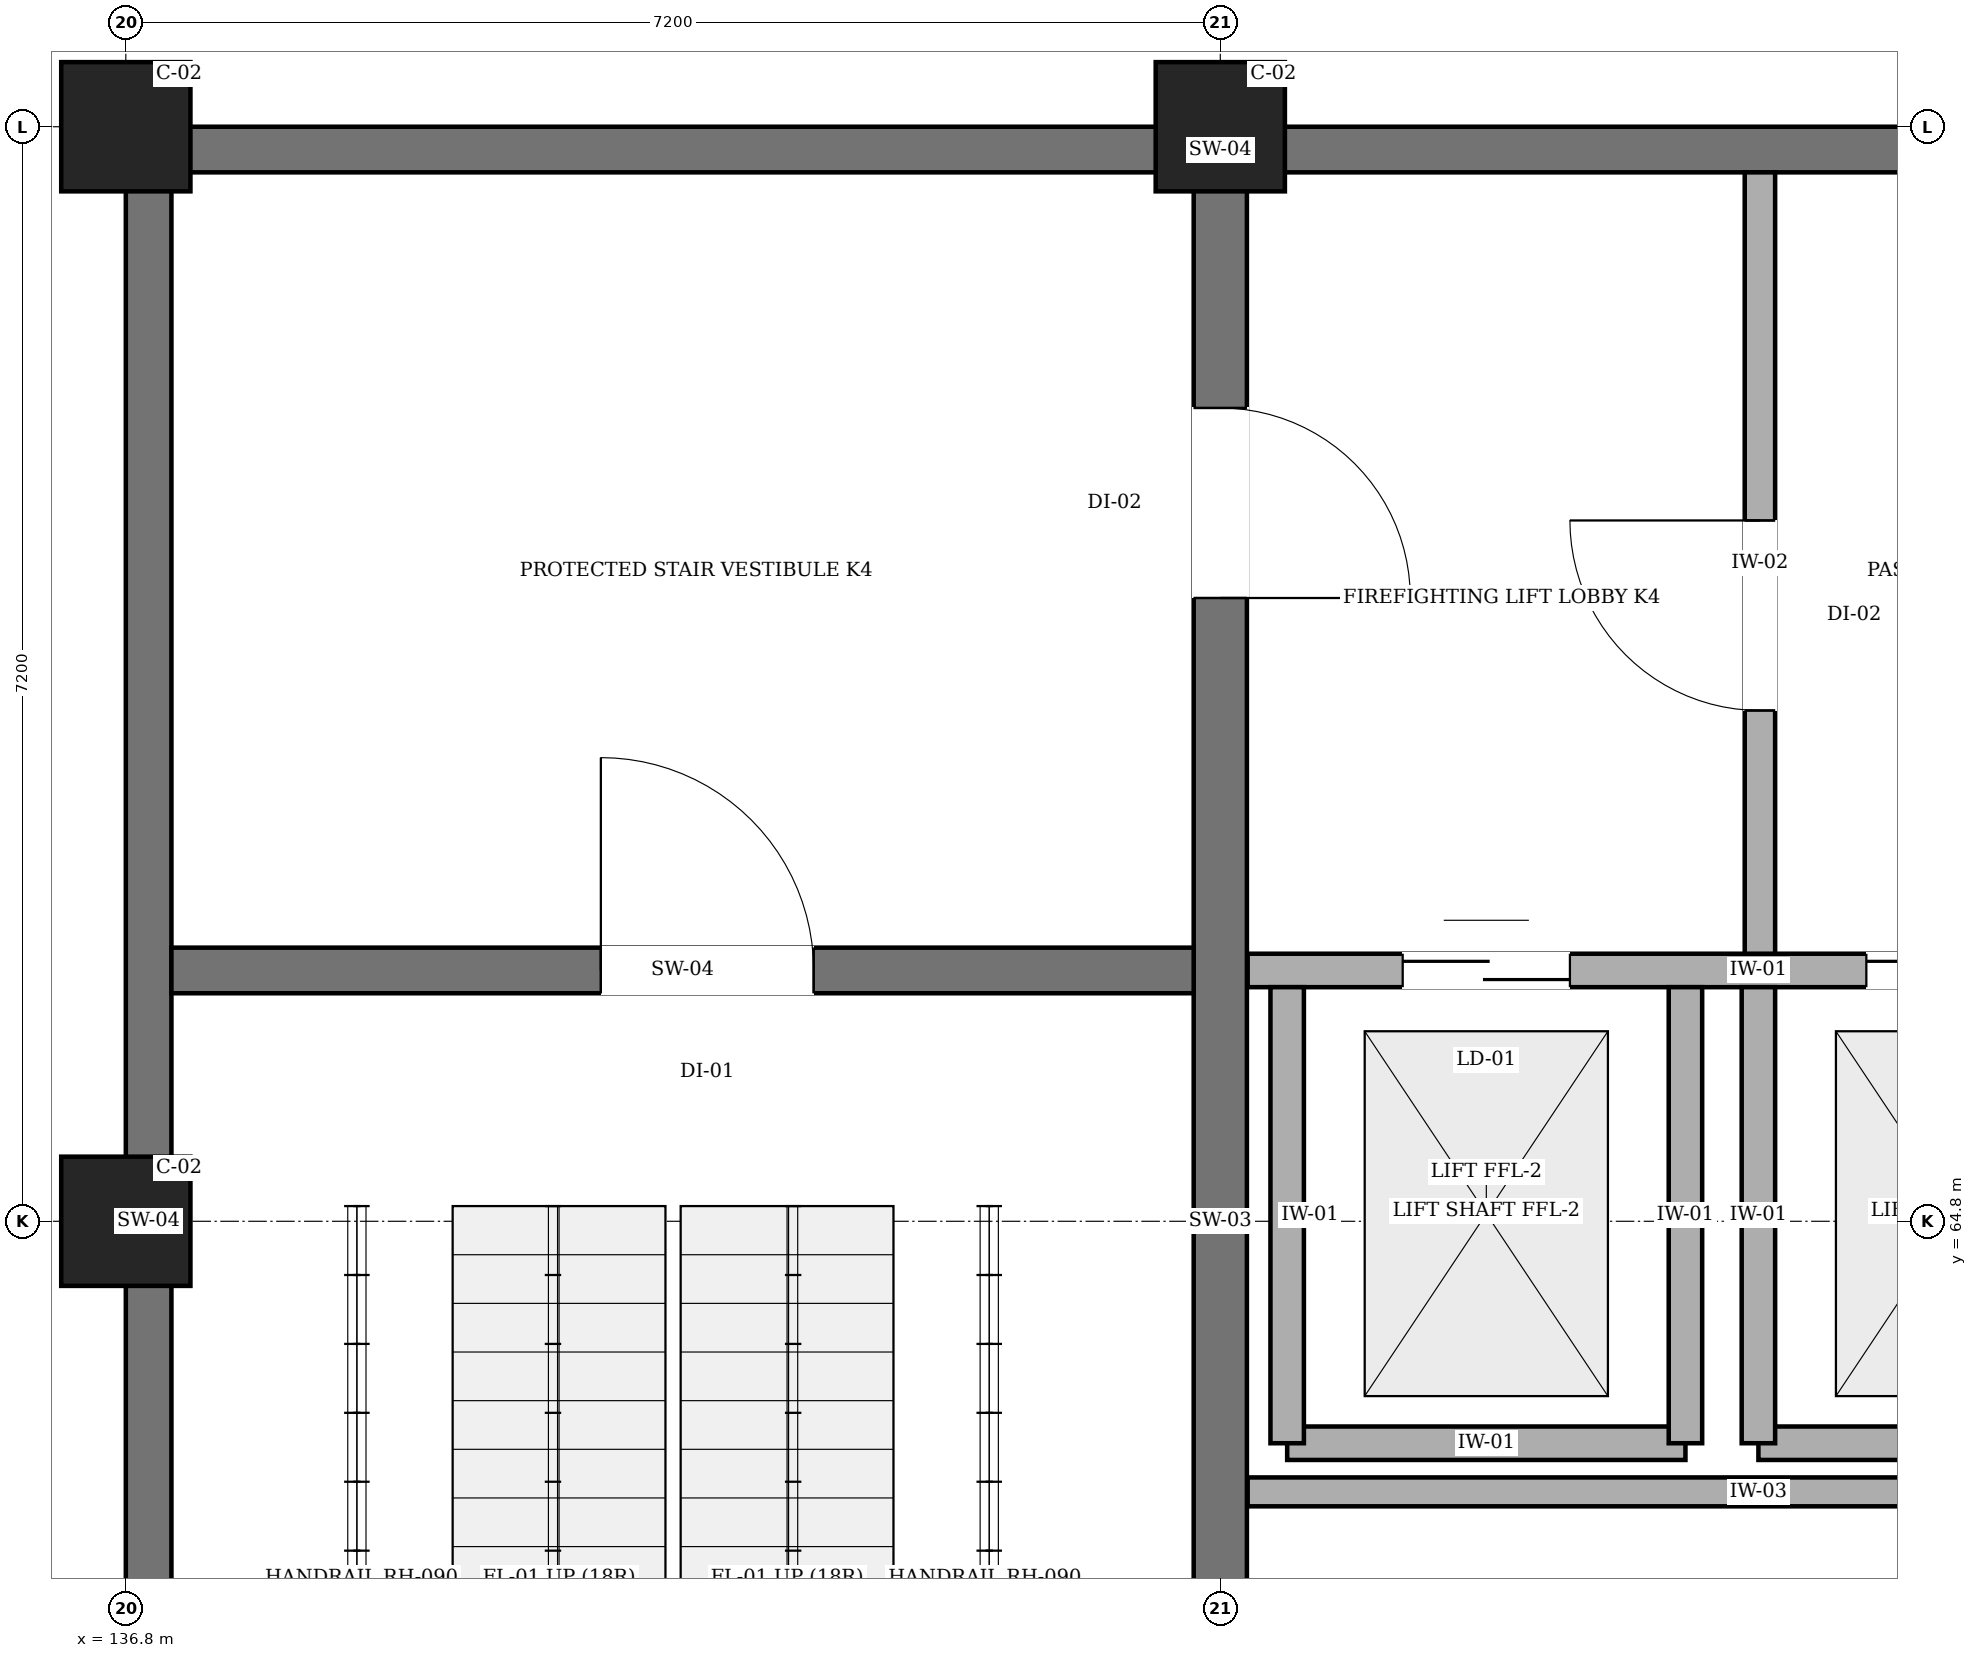
"""IFC4 building model, lengths in metres.
Left out: names, types, materials, properties, quantities, classifications, styles, units other than length and angle.
Written with IfcOpenShell. Run it as: python <this file> out.ifc"""

import sys

from ifc_helpers import new_model, si_unit, direction, frame, frame_2d, origin, origin_2d, place, context, subcontext, project, spatial, rectangle, extrude, element, fill, save


model = new_model("IFC4")
c1 = context("Model", 3, precision=1e-05, world=origin(), true_north=direction((0.0, 1.0)))
c2 = subcontext(c1, "Body", "Model", "MODEL_VIEW")
j1 = project(units=[si_unit("LENGTHUNIT", "METRE"), si_unit("PLANEANGLEUNIT", "RADIAN")], contexts=[c1])
p1 = place(None, origin())
s1 = spatial("IfcSite", under=j1, at=p1, CompositionType="ELEMENT")
p2 = place(p1, origin())
s2 = spatial("IfcBuilding", under=s1, at=p2, CompositionType="ELEMENT")
p3 = place(p2, frame((0.0, 0.0, -10.8)))
s3 = spatial("IfcBuildingStorey", under=s2, at=p3, CompositionType="ELEMENT", Elevation=-10.8)
p4 = place(p3, frame((136.8, 71.85, 0.0), z_axis=(0.0, 0.0, 1.0), x_axis=(1.0, 0.0, 0.0)))
e1 = element("IfcWall", 1, at=p4, inside=s3, PredefinedType="SHEAR", context=c2, shape_type="SweptSolid", body=[
    extrude(rectangle(XDim=14.4, YDim=0.3, at=frame_2d((7.2, 0.0))), origin(), (0.0, 0.0, 1.0), 5.4),
])
p5 = place(p3, frame((136.95, 57.9, 0.0), z_axis=(0.0, 0.0, 1.0), x_axis=(0.0, 1.0, 0.0)))
e2 = element("IfcWall", 2, at=p5, inside=s3, PredefinedType="SHEAR", context=c2, shape_type="SweptSolid", body=[
    extrude(rectangle(XDim=13.8, YDim=0.3, at=frame_2d((6.9, 0.0))), origin(), (0.0, 0.0, 1.0), 5.4),
])
p6 = place(p3, frame((144.0, 71.7, 0.0), z_axis=(0.0, 0.0, 1.0), x_axis=(0.0, -1.0, 0.0)))
e3 = element("IfcWall", 3, at=p6, inside=s3, PredefinedType="SHEAR", context=c2, shape_type="SweptSolid", body=[
    extrude(rectangle(XDim=13.8, YDim=0.35, at=frame_2d((6.9, 0.0))), origin(), (0.0, 0.0, 1.0), 5.4),
])
p7 = place(p6, frame((1.55, 0.0, 0.0)))
e4 = element("IfcOpeningElement", 4, at=p7, cuts=e3, PredefinedType="OPENING", context=c2, shape_type="SweptSolid", body=[
    extrude(rectangle(XDim=1.25, YDim=2.2, at=frame_2d((0.625, 1.1))), frame((0.0, 0.185, 0.0), z_axis=(0.0, -1.0, 0.0), x_axis=(1.0, 0.0, 0.0)), (0.0, 0.0, 1.0), 0.37),
])
p8 = place(p3, frame((137.1, 66.45, 0.0), z_axis=(0.0, 0.0, 1.0), x_axis=(1.0, 0.0, 0.0)))
e5 = element("IfcWall", 5, at=p8, inside=s3, PredefinedType="SHEAR", context=c2, shape_type="SweptSolid", body=[
    extrude(rectangle(XDim=6.725, YDim=0.3, at=frame_2d((3.362, 0.0))), origin(), (0.0, 0.0, 1.0), 5.4),
])
p9 = place(p8, frame((2.825, 0.0, 0.0)))
e6 = element("IfcOpeningElement", 6, at=p9, cuts=e5, PredefinedType="OPENING", context=c2, shape_type="SweptSolid", body=[
    extrude(rectangle(XDim=1.4, YDim=2.2, at=frame_2d((0.7, 1.1))), frame((0.0, 0.16, 0.0), z_axis=(0.0, -1.0, 0.0), x_axis=(1.0, 0.0, 0.0)), (0.0, 0.0, 1.0), 0.32),
])
for number, where, z_axis, x_axis in (
    (7, (136.8, 64.8, 0.0), (0.0, 0.0, 1.0), (1.0, 0.0, 0.0)),
    (8, (136.8, 72.0, 0.0), (0.0, 0.0, 1.0), (1.0, 0.0, 0.0)),
    (9, (144.0, 72.0, 0.0), (0.0, 0.0, 1.0), (1.0, 0.0, 0.0)),
):
    element("IfcColumn", number, at=place(p3, frame(where, z_axis=z_axis, x_axis=x_axis)), inside=s3, PredefinedType="COLUMN", context=c2, shape_type="SweptSolid", body=[
        extrude(rectangle(XDim=0.85, YDim=0.85, at=origin_2d()), origin(), (0.0, 0.0, 1.0), 5.0),
    ])
p10 = place(p3, frame((144.18, 63.02, 0.0), z_axis=(0.0, 0.0, 1.0), x_axis=(1.0, 0.0, 0.0)))
e10 = element("IfcWall", 10, at=p10, inside=s3, PredefinedType="PARTITIONING", context=c2, shape_type="SweptSolid", body=[
    extrude(rectangle(XDim=6.72, YDim=0.19, at=frame_2d((3.36, 0.0))), origin(), (0.0, 0.0, 1.0), 5.05),
])
p11 = place(p3, frame((144.18, 66.45, 0.0), z_axis=(0.0, 0.0, 1.0), x_axis=(1.0, 0.0, 0.0)))
e11 = element("IfcWall", 11, at=p11, inside=s3, PredefinedType="PARTITIONING", context=c2, shape_type="SweptSolid", body=[
    extrude(rectangle(XDim=6.72, YDim=0.22, at=frame_2d((3.36, 0.0))), origin(), (0.0, 0.0, 1.0), 5.05),
])
p12 = place(p11, frame((1.02, 0.0, 0.0)))
e12 = element("IfcOpeningElement", 12, at=p12, cuts=e11, PredefinedType="OPENING", context=c2, shape_type="SweptSolid", body=[
    extrude(rectangle(XDim=1.1, YDim=2.15, at=frame_2d((0.55, 1.075))), frame((0.0, 0.12, 0.0), z_axis=(0.0, -1.0, 0.0), x_axis=(1.0, 0.0, 0.0)), (0.0, 0.0, 1.0), 0.24),
])
p13 = place(p11, frame((4.07, 0.0, 0.0)))
e13 = element("IfcOpeningElement", 13, at=p13, cuts=e11, PredefinedType="OPENING", context=c2, shape_type="SweptSolid", body=[
    extrude(rectangle(XDim=1.2, YDim=2.15, at=frame_2d((0.6, 1.075))), frame((0.0, 0.12, 0.0), z_axis=(0.0, -1.0, 0.0), x_axis=(1.0, 0.0, 0.0)), (0.0, 0.0, 1.0), 0.24),
])
p14 = place(p3, frame((144.44, 63.34, 0.0), z_axis=(0.0, 0.0, 1.0), x_axis=(1.0, 0.0, 0.0)))
e14 = element("IfcWall", 14, at=p14, inside=s3, PredefinedType="PARTITIONING", context=c2, shape_type="SweptSolid", body=[
    extrude(rectangle(XDim=2.62, YDim=0.22, at=frame_2d((1.31, 0.0))), origin(), (0.0, 0.0, 1.0), 5.05),
])
for number, where, z_axis, x_axis in (
    (15, (144.44, 63.34, 0.0), (0.0, 0.0, 1.0), (0.0, 1.0, 0.0)),
    (16, (147.06, 63.34, 0.0), (0.0, 0.0, 1.0), (0.0, 1.0, 0.0)),
):
    element("IfcWall", number, at=place(p3, frame(where, z_axis=z_axis, x_axis=x_axis)), inside=s3, PredefinedType="PARTITIONING", context=c2, shape_type="SweptSolid", body=[
        extrude(rectangle(XDim=3.0, YDim=0.22, at=frame_2d((1.5, 0.0))), origin(), (0.0, 0.0, 1.0), 5.05),
    ])
p15 = place(p3, frame((147.54, 63.34, 0.0), z_axis=(0.0, 0.0, 1.0), x_axis=(1.0, 0.0, 0.0)))
e17 = element("IfcWall", 17, at=p15, inside=s3, PredefinedType="PARTITIONING", context=c2, shape_type="SweptSolid", body=[
    extrude(rectangle(XDim=2.62, YDim=0.22, at=frame_2d((1.31, 0.0))), origin(), (0.0, 0.0, 1.0), 5.05),
])
p16 = place(p3, frame((147.54, 63.34, 0.0), z_axis=(0.0, 0.0, 1.0), x_axis=(0.0, 1.0, 0.0)))
e18 = element("IfcWall", 18, at=p16, inside=s3, PredefinedType="PARTITIONING", context=c2, shape_type="SweptSolid", body=[
    extrude(rectangle(XDim=3.0, YDim=0.22, at=frame_2d((1.5, 0.0))), origin(), (0.0, 0.0, 1.0), 5.05),
])
p17 = place(p3, frame((147.55, 66.56, 0.0), z_axis=(0.0, 0.0, 1.0), x_axis=(0.0, 1.0, 0.0)))
e19 = element("IfcWall", 19, at=p17, inside=s3, PredefinedType="PARTITIONING", context=c2, shape_type="SweptSolid", body=[
    extrude(rectangle(XDim=5.14, YDim=0.2, at=frame_2d((2.57, 0.0))), origin(), (0.0, 0.0, 1.0), 5.05),
])
p18 = place(p17, frame((1.6, 0.0, 0.0)))
e20 = element("IfcOpeningElement", 20, at=p18, cuts=e19, PredefinedType="OPENING", context=c2, shape_type="SweptSolid", body=[
    extrude(rectangle(XDim=1.25, YDim=2.2, at=frame_2d((0.625, 1.1))), frame((0.0, 0.11, 0.0), z_axis=(0.0, -1.0, 0.0), x_axis=(1.0, 0.0, 0.0)), (0.0, 0.0, 1.0), 0.22),
])
p19 = place(p9, origin())
e21 = element("IfcDoor", 21, at=p19, inside=s3, OperationType="SINGLE_SWING_LEFT", PredefinedType="DOOR", context=c2, shape_type="SweptSolid", body=[
    extrude(rectangle(XDim=1.4, YDim=2.2, at=frame_2d((0.7, 1.1))), frame((0.0, 0.025, 0.0), z_axis=(0.0, -1.0, 0.0), x_axis=(1.0, 0.0, 0.0)), (0.0, 0.0, 1.0), 0.05),
])
fill(e6, e21)
p20 = place(p7, origin())
e22 = element("IfcDoor", 22, at=p20, inside=s3, OperationType="SINGLE_SWING_RIGHT", PredefinedType="DOOR", context=c2, shape_type="SweptSolid", body=[
    extrude(rectangle(XDim=1.25, YDim=2.2, at=frame_2d((0.625, 1.1))), frame((0.0, 0.025, 0.0), z_axis=(0.0, -1.0, 0.0), x_axis=(1.0, 0.0, 0.0)), (0.0, 0.0, 1.0), 0.05),
])
fill(e4, e22)
p21 = place(p12, origin())
e23 = element("IfcDoor", 23, at=p21, inside=s3, OperationType="DOUBLE_DOOR_SLIDING", PredefinedType="DOOR", context=c2, shape_type="SweptSolid", body=[
    extrude(rectangle(XDim=1.1, YDim=2.15, at=frame_2d((0.55, 1.075))), frame((0.0, 0.025, 0.0), z_axis=(0.0, -1.0, 0.0), x_axis=(1.0, 0.0, 0.0)), (0.0, 0.0, 1.0), 0.05),
])
fill(e12, e23)
p22 = place(p13, origin())
e24 = element("IfcDoor", 24, at=p22, inside=s3, OperationType="DOUBLE_DOOR_SLIDING", PredefinedType="DOOR", context=c2, shape_type="SweptSolid", body=[
    extrude(rectangle(XDim=1.2, YDim=2.15, at=frame_2d((0.6, 1.075))), frame((0.0, 0.025, 0.0), z_axis=(0.0, -1.0, 0.0), x_axis=(1.0, 0.0, 0.0)), (0.0, 0.0, 1.0), 0.05),
])
fill(e13, e24)
p23 = place(p18, origin())
e25 = element("IfcDoor", 25, at=p23, inside=s3, OperationType="SINGLE_SWING_RIGHT", PredefinedType="DOOR", context=c2, shape_type="SweptSolid", body=[
    extrude(rectangle(XDim=1.25, YDim=2.2, at=frame_2d((0.625, 1.1))), frame((0.0, 0.025, 0.0), z_axis=(0.0, -1.0, 0.0), x_axis=(1.0, 0.0, 0.0)), (0.0, 0.0, 1.0), 0.05),
])
fill(e20, e25)
save(model, sys.argv[1])
